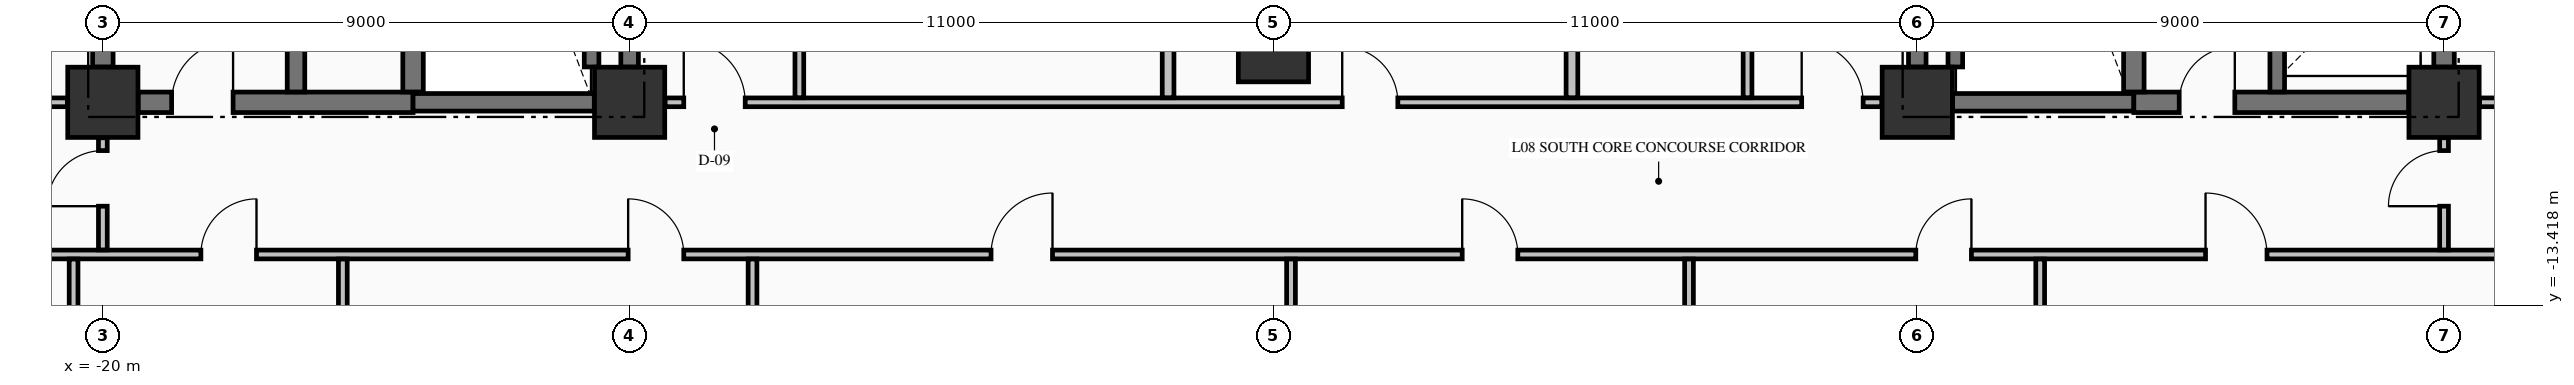
"""IFC4 building model, lengths in metres.
Left out: names, types, materials, properties, quantities, classifications, styles, units other than length and angle.
Written with IfcOpenShell. Run it as: python <this file> out.ifc"""

import sys

from ifc_helpers import new_model, si_unit, direction, frame, frame_2d, origin, origin_2d, place, context, subcontext, project, spatial, rectangle, extrude, element, fill, save


model = new_model("IFC4")
c1 = context("Model", 3, precision=1e-05, world=origin(), true_north=direction((0.0, 1.0)))
c2 = subcontext(c1, "Body", "Model", "MODEL_VIEW")
j1 = project(units=[si_unit("LENGTHUNIT", "METRE"), si_unit("PLANEANGLEUNIT", "RADIAN")], contexts=[c1])
p1 = place(None, origin())
s1 = spatial("IfcSite", under=j1, at=p1, CompositionType="ELEMENT")
p2 = place(p1, origin())
s2 = spatial("IfcBuilding", under=s1, at=p2, CompositionType="ELEMENT")
p3 = place(p2, frame((0.0, 0.0, 37.91)))
s3 = spatial("IfcBuildingStorey", under=s2, at=p3, CompositionType="ELEMENT", Elevation=37.91)
for number, where, z_axis, x_axis in (
    (1, (-20.0, -9.95, -0.25), (0.0, 0.0, 1.0), (1.0, 0.0, 0.0)),
    (2, (-11.0, -9.95, -0.25), (0.0, 0.0, 1.0), (1.0, 0.0, 0.0)),
    (3, (11.0, -9.95, -0.25), (0.0, 0.0, 1.0), (1.0, 0.0, 0.0)),
    (4, (20.0, -9.95, -0.25), (0.0, 0.0, 1.0), (1.0, 0.0, 0.0)),
    (5, (0.0, -9.0, -0.25), (0.0, 0.0, 1.0), (1.0, 0.0, 0.0)),
):
    element("IfcColumn", number, at=place(p3, frame(where, z_axis=z_axis, x_axis=x_axis)), inside=s3, PredefinedType="COLUMN", context=c2, shape_type="SweptSolid", body=[
        extrude(rectangle(XDim=1.2, YDim=1.2, at=origin_2d()), origin(), (0.0, 0.0, 1.0), 3.57),
    ])
p4 = place(p3, frame((-19.396, -9.95, 0.0), z_axis=(0.0, 0.0, 1.0), x_axis=(1.0, 0.0, 0.0)))
e6 = element("IfcWall", 6, at=p4, inside=s3, PredefinedType="SHEAR", context=c2, shape_type="SweptSolid", body=[
    extrude(rectangle(XDim=4.696, YDim=0.35, at=frame_2d((2.348, 0.0))), origin(), (0.0, 0.0, 1.0), 3.32),
])
p5 = place(p4, frame((0.571, 0.0, 0.0)))
e7 = element("IfcOpeningElement", 7, at=p5, cuts=e6, PredefinedType="OPENING", context=c2, shape_type="SweptSolid", body=[
    extrude(rectangle(XDim=1.05, YDim=2.15, at=frame_2d((0.525, 1.075))), frame((0.0, 0.185, 0.0), z_axis=(0.0, -1.0, 0.0), x_axis=(1.0, 0.0, 0.0)), (0.0, 0.0, 1.0), 0.37),
])
for number, where, z_axis, x_axis in (
    (8, (-14.7, -9.95, 0.0), (0.0, 0.0, 1.0), (1.0, 0.0, 0.0)),
    (9, (11.604, -9.95, 0.0), (0.0, 0.0, 1.0), (1.0, 0.0, 0.0)),
):
    element("IfcWall", number, at=place(p3, frame(where, z_axis=z_axis, x_axis=x_axis)), inside=s3, PredefinedType="SHEAR", context=c2, shape_type="SweptSolid", body=[
        extrude(rectangle(XDim=3.096, YDim=0.3, at=frame_2d((1.548, 0.0))), origin(), (0.0, 0.0, 1.0), 3.32),
    ])
p6 = place(p3, frame((14.7, -9.95, 0.0), z_axis=(0.0, 0.0, 1.0), x_axis=(1.0, 0.0, 0.0)))
e10 = element("IfcWall", 10, at=p6, inside=s3, PredefinedType="SHEAR", context=c2, shape_type="SweptSolid", body=[
    extrude(rectangle(XDim=4.696, YDim=0.35, at=frame_2d((2.348, 0.0))), origin(), (0.0, 0.0, 1.0), 3.32),
])
p7 = place(p6, frame((0.775, 0.0, 0.0)))
e11 = element("IfcOpeningElement", 11, at=p7, cuts=e10, PredefinedType="OPENING", context=c2, shape_type="SweptSolid", body=[
    extrude(rectangle(XDim=0.95, YDim=2.15, at=frame_2d((0.475, 1.075))), frame((0.0, 0.185, 0.0), z_axis=(0.0, -1.0, 0.0), x_axis=(1.0, 0.0, 0.0)), (0.0, 0.0, 1.0), 0.37),
])
p8 = place(p3, frame((-23.835, -12.55, 0.0), z_axis=(0.0, 0.0, 1.0), x_axis=(1.0, 0.0, 0.0)))
e12 = element("IfcWall", 12, at=p8, inside=s3, PredefinedType="PARTITIONING", context=c2, shape_type="SweptSolid", body=[
    extrude(rectangle(XDim=52.67, YDim=0.15, at=frame_2d((26.335, 0.0))), origin(), (0.0, 0.0, 1.0), 3.32),
])
p9 = place(p8, frame((5.51, 0.0, 0.0)))
e13 = element("IfcOpeningElement", 13, at=p9, cuts=e12, PredefinedType="OPENING", context=c2, shape_type="SweptSolid", body=[
    extrude(rectangle(XDim=0.95, YDim=2.15, at=frame_2d((0.475, 1.075))), frame((0.0, 0.085, 0.0), z_axis=(0.0, -1.0, 0.0), x_axis=(1.0, 0.0, 0.0)), (0.0, 0.0, 1.0), 0.17),
])
p10 = place(p8, frame((12.81, 0.0, 0.0)))
e14 = element("IfcOpeningElement", 14, at=p10, cuts=e12, PredefinedType="OPENING", context=c2, shape_type="SweptSolid", body=[
    extrude(rectangle(XDim=0.95, YDim=2.15, at=frame_2d((0.475, 1.075))), frame((0.0, 0.085, 0.0), z_axis=(0.0, -1.0, 0.0), x_axis=(1.0, 0.0, 0.0)), (0.0, 0.0, 1.0), 0.17),
])
p11 = place(p8, frame((19.01, 0.0, 0.0)))
e15 = element("IfcOpeningElement", 15, at=p11, cuts=e12, PredefinedType="OPENING", context=c2, shape_type="SweptSolid", body=[
    extrude(rectangle(XDim=1.05, YDim=2.15, at=frame_2d((0.525, 1.075))), frame((0.0, 0.085, 0.0), z_axis=(0.0, -1.0, 0.0), x_axis=(1.0, 0.0, 0.0)), (0.0, 0.0, 1.0), 0.17),
])
p12 = place(p8, frame((27.06, 0.0, 0.0)))
e16 = element("IfcOpeningElement", 16, at=p12, cuts=e12, PredefinedType="OPENING", context=c2, shape_type="SweptSolid", body=[
    extrude(rectangle(XDim=0.95, YDim=2.15, at=frame_2d((0.475, 1.075))), frame((0.0, 0.085, 0.0), z_axis=(0.0, -1.0, 0.0), x_axis=(1.0, 0.0, 0.0)), (0.0, 0.0, 1.0), 0.17),
])
p13 = place(p8, frame((34.81, 0.0, 0.0)))
e17 = element("IfcOpeningElement", 17, at=p13, cuts=e12, PredefinedType="OPENING", context=c2, shape_type="SweptSolid", body=[
    extrude(rectangle(XDim=0.95, YDim=2.15, at=frame_2d((0.475, 1.075))), frame((0.0, 0.085, 0.0), z_axis=(0.0, -1.0, 0.0), x_axis=(1.0, 0.0, 0.0)), (0.0, 0.0, 1.0), 0.17),
])
p14 = place(p8, frame((39.76, 0.0, 0.0)))
e18 = element("IfcOpeningElement", 18, at=p14, cuts=e12, PredefinedType="OPENING", context=c2, shape_type="SweptSolid", body=[
    extrude(rectangle(XDim=1.05, YDim=2.15, at=frame_2d((0.525, 1.075))), frame((0.0, 0.085, 0.0), z_axis=(0.0, -1.0, 0.0), x_axis=(1.0, 0.0, 0.0)), (0.0, 0.0, 1.0), 0.17),
])
p15 = place(p3, frame((-23.835, -9.95, 0.0), z_axis=(0.0, 0.0, 1.0), x_axis=(1.0, 0.0, 0.0)))
e19 = element("IfcWall", 19, at=p15, inside=s3, PredefinedType="PARTITIONING", context=c2, shape_type="SweptSolid", body=[
    extrude(rectangle(XDim=3.229, YDim=0.15, at=frame_2d((1.615, 0.0))), origin(), (0.0, 0.0, 1.0), 3.32),
])
p16 = place(p15, frame((1.335, 0.0, 0.0)))
e20 = element("IfcOpeningElement", 20, at=p16, cuts=e19, PredefinedType="OPENING", context=c2, shape_type="SweptSolid", body=[
    extrude(rectangle(XDim=1.0, YDim=2.15, at=frame_2d((0.5, 1.075))), frame((0.0, 0.085, 0.0), z_axis=(0.0, -1.0, 0.0), x_axis=(1.0, 0.0, 0.0)), (0.0, 0.0, 1.0), 0.17),
])
p17 = place(p3, frame((-10.394, -9.95, 0.0), z_axis=(0.0, 0.0, 1.0), x_axis=(1.0, 0.0, 0.0)))
e21 = element("IfcWall", 21, at=p17, inside=s3, PredefinedType="PARTITIONING", context=c2, shape_type="SweptSolid", body=[
    extrude(rectangle(XDim=20.788, YDim=0.15, at=frame_2d((10.394, 0.0))), origin(), (0.0, 0.0, 1.0), 3.32),
])
p18 = place(p17, frame((0.319, 0.0, 0.0)))
e22 = element("IfcOpeningElement", 22, at=p18, cuts=e21, PredefinedType="OPENING", context=c2, shape_type="SweptSolid", body=[
    extrude(rectangle(XDim=1.05, YDim=2.15, at=frame_2d((0.525, 1.075))), frame((0.0, 0.085, 0.0), z_axis=(0.0, -1.0, 0.0), x_axis=(1.0, 0.0, 0.0)), (0.0, 0.0, 1.0), 0.17),
])
p19 = place(p17, frame((19.419, 0.0, 0.0)))
e23 = element("IfcOpeningElement", 23, at=p19, cuts=e21, PredefinedType="OPENING", context=c2, shape_type="SweptSolid", body=[
    extrude(rectangle(XDim=1.05, YDim=2.15, at=frame_2d((0.525, 1.075))), frame((0.0, 0.085, 0.0), z_axis=(0.0, -1.0, 0.0), x_axis=(1.0, 0.0, 0.0)), (0.0, 0.0, 1.0), 0.17),
])
p20 = place(p17, frame((11.569, 0.0, 0.0)))
e24 = element("IfcOpeningElement", 24, at=p20, cuts=e21, PredefinedType="OPENING", context=c2, shape_type="SweptSolid", body=[
    extrude(rectangle(XDim=0.95, YDim=2.15, at=frame_2d((0.475, 1.075))), frame((0.0, 0.085, 0.0), z_axis=(0.0, -1.0, 0.0), x_axis=(1.0, 0.0, 0.0)), (0.0, 0.0, 1.0), 0.17),
])
p21 = place(p3, frame((20.606, -9.95, 0.0), z_axis=(0.0, 0.0, 1.0), x_axis=(1.0, 0.0, 0.0)))
e25 = element("IfcWall", 25, at=p21, inside=s3, PredefinedType="PARTITIONING", context=c2, shape_type="SweptSolid", body=[
    extrude(rectangle(XDim=8.229, YDim=0.15, at=frame_2d((4.115, 0.0))), origin(), (0.0, 0.0, 1.0), 3.32),
])
p22 = place(p21, frame((3.419, 0.0, 0.0)))
e26 = element("IfcOpeningElement", 26, at=p22, cuts=e25, PredefinedType="OPENING", context=c2, shape_type="SweptSolid", body=[
    extrude(rectangle(XDim=0.95, YDim=2.15, at=frame_2d((0.475, 1.075))), frame((0.0, 0.085, 0.0), z_axis=(0.0, -1.0, 0.0), x_axis=(1.0, 0.0, 0.0)), (0.0, 0.0, 1.0), 0.17),
])
p23 = place(p3, frame((-20.0, -9.346, 0.0), z_axis=(0.0, 0.0, 1.0), x_axis=(0.0, 1.0, 0.0)))
e27 = element("IfcWall", 27, at=p23, inside=s3, PredefinedType="SHEAR", context=c2, shape_type="SweptSolid", body=[
    extrude(rectangle(XDim=8.742, YDim=0.35, at=frame_2d((4.371, 0.0))), origin(), (0.0, 0.0, 1.0), 3.32),
])
p24 = place(p3, frame((-16.7, -9.773, 0.0), z_axis=(0.0, 0.0, 1.0), x_axis=(0.0, 1.0, 0.0)))
e28 = element("IfcWall", 28, at=p24, inside=s3, PredefinedType="SHEAR", context=c2, shape_type="SweptSolid", body=[
    extrude(rectangle(XDim=9.371, YDim=0.3, at=frame_2d((4.686, 0.0))), origin(), (0.0, 0.0, 1.0), 3.32),
])
p25 = place(p3, frame((-14.7, -9.773, 0.0), z_axis=(0.0, 0.0, 1.0), x_axis=(0.0, 1.0, 0.0)))
e29 = element("IfcWall", 29, at=p25, inside=s3, PredefinedType="SHEAR", context=c2, shape_type="SweptSolid", body=[
    extrude(rectangle(XDim=9.371, YDim=0.35, at=frame_2d((4.686, 0.0))), origin(), (0.0, 0.0, 1.0), 3.32),
])
p26 = place(p3, frame((-11.65, -9.346, 0.0), z_axis=(0.0, 0.0, 1.0), x_axis=(0.0, 1.0, 0.0)))
e30 = element("IfcWall", 30, at=p26, inside=s3, PredefinedType="SOLIDWALL", context=c2, shape_type="SweptSolid", body=[
    extrude(rectangle(XDim=8.742, YDim=0.25, at=frame_2d((4.371, 0.0))), origin(), (0.0, 0.0, 1.0), 3.32),
])
for number, where, z_axis, x_axis in (
    (31, (-11.0, -9.346, 0.0), (0.0, 0.0, 1.0), (0.0, 1.0, 0.0)),
    (32, (11.0, -9.346, 0.0), (0.0, 0.0, 1.0), (0.0, 1.0, 0.0)),
):
    element("IfcWall", number, at=place(p3, frame(where, z_axis=z_axis, x_axis=x_axis)), inside=s3, PredefinedType="SHEAR", context=c2, shape_type="SweptSolid", body=[
        extrude(rectangle(XDim=8.742, YDim=0.3, at=frame_2d((4.371, 0.0))), origin(), (0.0, 0.0, 1.0), 3.32),
    ])
p27 = place(p3, frame((11.65, -9.346, 0.0), z_axis=(0.0, 0.0, 1.0), x_axis=(0.0, 1.0, 0.0)))
e33 = element("IfcWall", 33, at=p27, inside=s3, PredefinedType="SOLIDWALL", context=c2, shape_type="SweptSolid", body=[
    extrude(rectangle(XDim=8.742, YDim=0.25, at=frame_2d((4.371, 0.0))), origin(), (0.0, 0.0, 1.0), 3.32),
])
p28 = place(p3, frame((14.7, -9.773, 0.0), z_axis=(0.0, 0.0, 1.0), x_axis=(0.0, 1.0, 0.0)))
e34 = element("IfcWall", 34, at=p28, inside=s3, PredefinedType="SHEAR", context=c2, shape_type="SweptSolid", body=[
    extrude(rectangle(XDim=9.371, YDim=0.35, at=frame_2d((4.686, 0.0))), origin(), (0.0, 0.0, 1.0), 3.32),
])
p29 = place(p3, frame((17.15, -9.773, 0.0), z_axis=(0.0, 0.0, 1.0), x_axis=(0.0, 1.0, 0.0)))
e35 = element("IfcWall", 35, at=p29, inside=s3, PredefinedType="SOLIDWALL", context=c2, shape_type="SweptSolid", body=[
    extrude(rectangle(XDim=2.596, YDim=0.25, at=frame_2d((1.298, 0.0))), origin(), (0.0, 0.0, 1.0), 3.32),
])
p30 = place(p3, frame((20.0, -9.346, 0.0), z_axis=(0.0, 0.0, 1.0), x_axis=(0.0, 1.0, 0.0)))
e36 = element("IfcWall", 36, at=p30, inside=s3, PredefinedType="SHEAR", context=c2, shape_type="SweptSolid", body=[
    extrude(rectangle(XDim=2.169, YDim=0.35, at=frame_2d((1.084, 0.0))), origin(), (0.0, 0.0, 1.0), 3.32),
])
p31 = place(p3, frame((-20.5, -22.294, 0.0), z_axis=(0.0, 0.0, 1.0), x_axis=(0.0, 1.0, 0.0)))
e37 = element("IfcWall", 37, at=p31, inside=s3, PredefinedType="PARTITIONING", context=c2, shape_type="SweptSolid", body=[
    extrude(rectangle(XDim=9.666, YDim=0.15, at=frame_2d((4.833, 0.0))), origin(), (0.0, 0.0, 1.0), 3.32),
])
p32 = place(p3, frame((-20.0, -12.472, 0.0), z_axis=(0.0, 0.0, 1.0), x_axis=(0.0, 1.0, 0.0)))
e38 = element("IfcWall", 38, at=p32, inside=s3, PredefinedType="PARTITIONING", context=c2, shape_type="SweptSolid", body=[
    extrude(rectangle(XDim=1.916, YDim=0.15, at=frame_2d((0.958, 0.0))), origin(), (0.0, 0.0, 1.0), 3.32),
])
p33 = place(p32, frame((0.747, 0.0, 0.0)))
e39 = element("IfcOpeningElement", 39, at=p33, cuts=e38, PredefinedType="OPENING", context=c2, shape_type="SweptSolid", body=[
    extrude(rectangle(XDim=0.95, YDim=2.15, at=frame_2d((0.475, 1.075))), frame((0.0, 0.085, 0.0), z_axis=(0.0, -1.0, 0.0), x_axis=(1.0, 0.0, 0.0)), (0.0, 0.0, 1.0), 0.17),
])
for number, where, z_axis, x_axis in (
    (40, (-15.9, -26.335, 0.0), (0.0, 0.0, 1.0), (0.0, 1.0, 0.0)),
    (41, (-8.9, -26.335, 0.0), (0.0, 0.0, 1.0), (0.0, 1.0, 0.0)),
):
    element("IfcWall", number, at=place(p3, frame(where, z_axis=z_axis, x_axis=x_axis)), inside=s3, PredefinedType="PARTITIONING", context=c2, shape_type="SweptSolid", body=[
        extrude(rectangle(XDim=13.707, YDim=0.15, at=frame_2d((6.854, 0.0))), origin(), (0.0, 0.0, 1.0), 3.32),
    ])
p34 = place(p3, frame((-8.1, -9.872, 0.0), z_axis=(0.0, 0.0, 1.0), x_axis=(0.0, 1.0, 0.0)))
e42 = element("IfcWall", 42, at=p34, inside=s3, PredefinedType="PARTITIONING", context=c2, shape_type="SweptSolid", body=[
    extrude(rectangle(XDim=10.569, YDim=0.15, at=frame_2d((5.285, 0.0))), origin(), (0.0, 0.0, 1.0), 3.32),
])
p35 = place(p34, frame((4.827, 0.0, 0.0)))
e43 = element("IfcOpeningElement", 43, at=p35, cuts=e42, PredefinedType="OPENING", context=c2, shape_type="SweptSolid", body=[
    extrude(rectangle(XDim=0.95, YDim=2.15, at=frame_2d((0.475, 1.075))), frame((0.0, 0.085, 0.0), z_axis=(0.0, -1.0, 0.0), x_axis=(1.0, 0.0, 0.0)), (0.0, 0.0, 1.0), 0.17),
])
p36 = place(p3, frame((-1.8, -9.872, 0.0), z_axis=(0.0, 0.0, 1.0), x_axis=(0.0, 1.0, 0.0)))
e44 = element("IfcWall", 44, at=p36, inside=s3, PredefinedType="PARTITIONING", context=c2, shape_type="SweptSolid", body=[
    extrude(rectangle(XDim=4.969, YDim=0.2, at=frame_2d((2.484, 0.0))), origin(), (0.0, 0.0, 1.0), 3.32),
])
p37 = place(p3, frame((0.3, -25.794, 0.0), z_axis=(0.0, 0.0, 1.0), x_axis=(0.0, 1.0, 0.0)))
e45 = element("IfcWall", 45, at=p37, inside=s3, PredefinedType="PARTITIONING", context=c2, shape_type="SweptSolid", body=[
    extrude(rectangle(XDim=13.166, YDim=0.15, at=frame_2d((6.583, 0.0))), origin(), (0.0, 0.0, 1.0), 2.66),
])
p38 = place(p3, frame((5.1, -9.872, 0.0), z_axis=(0.0, 0.0, 1.0), x_axis=(0.0, 1.0, 0.0)))
e46 = element("IfcWall", 46, at=p38, inside=s3, PredefinedType="PARTITIONING", context=c2, shape_type="SweptSolid", body=[
    extrude(rectangle(XDim=4.969, YDim=0.2, at=frame_2d((2.484, 0.0))), origin(), (0.0, 0.0, 1.0), 3.32),
])
p39 = place(p3, frame((7.1, -26.335, 0.0), z_axis=(0.0, 0.0, 1.0), x_axis=(0.0, 1.0, 0.0)))
e47 = element("IfcWall", 47, at=p39, inside=s3, PredefinedType="PARTITIONING", context=c2, shape_type="SweptSolid", body=[
    extrude(rectangle(XDim=13.707, YDim=0.15, at=frame_2d((6.854, 0.0))), origin(), (0.0, 0.0, 1.0), 3.32),
])
p40 = place(p3, frame((8.1, -9.872, 0.0), z_axis=(0.0, 0.0, 1.0), x_axis=(0.0, 1.0, 0.0)))
e48 = element("IfcWall", 48, at=p40, inside=s3, PredefinedType="PARTITIONING", context=c2, shape_type="SweptSolid", body=[
    extrude(rectangle(XDim=4.969, YDim=0.15, at=frame_2d((2.484, 0.0))), origin(), (0.0, 0.0, 1.0), 3.32),
])
p41 = place(p40, frame((1.997, 0.0, 0.0)))
e49 = element("IfcOpeningElement", 49, at=p41, cuts=e48, PredefinedType="OPENING", context=c2, shape_type="SweptSolid", body=[
    extrude(rectangle(XDim=0.95, YDim=2.15, at=frame_2d((0.475, 1.075))), frame((0.0, 0.085, 0.0), z_axis=(0.0, -1.0, 0.0), x_axis=(1.0, 0.0, 0.0)), (0.0, 0.0, 1.0), 0.17),
])
p42 = place(p3, frame((13.1, -26.335, 0.0), z_axis=(0.0, 0.0, 1.0), x_axis=(0.0, 1.0, 0.0)))
e50 = element("IfcWall", 50, at=p42, inside=s3, PredefinedType="PARTITIONING", context=c2, shape_type="SweptSolid", body=[
    extrude(rectangle(XDim=13.707, YDim=0.15, at=frame_2d((6.854, 0.0))), origin(), (0.0, 0.0, 1.0), 3.32),
])
p43 = place(p3, frame((20.0, -12.472, 0.0), z_axis=(0.0, 0.0, 1.0), x_axis=(0.0, 1.0, 0.0)))
e51 = element("IfcWall", 51, at=p43, inside=s3, PredefinedType="PARTITIONING", context=c2, shape_type="SweptSolid", body=[
    extrude(rectangle(XDim=1.916, YDim=0.15, at=frame_2d((0.958, 0.0))), origin(), (0.0, 0.0, 1.0), 2.66),
])
p44 = place(p43, frame((0.747, 0.0, 0.0)))
e52 = element("IfcOpeningElement", 52, at=p44, cuts=e51, PredefinedType="OPENING", context=c2, shape_type="SweptSolid", body=[
    extrude(rectangle(XDim=0.95, YDim=2.15, at=frame_2d((0.475, 1.075))), frame((0.0, 0.085, 0.0), z_axis=(0.0, -1.0, 0.0), x_axis=(1.0, 0.0, 0.0)), (0.0, 0.0, 1.0), 0.17),
])
p45 = place(p5, origin())
e53 = element("IfcDoor", 53, at=p45, inside=s3, OperationType="SINGLE_SWING_RIGHT", PredefinedType="DOOR", context=c2, shape_type="SweptSolid", body=[
    extrude(rectangle(XDim=1.05, YDim=2.15, at=frame_2d((0.525, 1.075))), frame((0.0, 0.025, 0.0), z_axis=(0.0, -1.0, 0.0), x_axis=(1.0, 0.0, 0.0)), (0.0, 0.0, 1.0), 0.05),
])
fill(e7, e53)
p46 = place(p7, origin())
e54 = element("IfcDoor", 54, at=p46, inside=s3, OperationType="SINGLE_SWING_RIGHT", PredefinedType="DOOR", context=c2, shape_type="SweptSolid", body=[
    extrude(rectangle(XDim=0.95, YDim=2.15, at=frame_2d((0.475, 1.075))), frame((0.0, 0.025, 0.0), z_axis=(0.0, -1.0, 0.0), x_axis=(1.0, 0.0, 0.0)), (0.0, 0.0, 1.0), 0.05),
])
fill(e11, e54)
p47 = place(p18, origin())
e55 = element("IfcDoor", 55, at=p47, inside=s3, OperationType="SINGLE_SWING_LEFT", PredefinedType="DOOR", context=c2, shape_type="SweptSolid", body=[
    extrude(rectangle(XDim=1.05, YDim=2.15, at=frame_2d((0.525, 1.075))), frame((0.0, 0.025, 0.0), z_axis=(0.0, -1.0, 0.0), x_axis=(1.0, 0.0, 0.0)), (0.0, 0.0, 1.0), 0.05),
])
fill(e22, e55)
p48 = place(p19, origin())
e56 = element("IfcDoor", 56, at=p48, inside=s3, OperationType="SINGLE_SWING_LEFT", PredefinedType="DOOR", context=c2, shape_type="SweptSolid", body=[
    extrude(rectangle(XDim=1.05, YDim=2.15, at=frame_2d((0.525, 1.075))), frame((0.0, 0.025, 0.0), z_axis=(0.0, -1.0, 0.0), x_axis=(1.0, 0.0, 0.0)), (0.0, 0.0, 1.0), 0.05),
])
fill(e23, e56)
p49 = place(p9, origin())
e57 = element("IfcDoor", 57, at=p49, inside=s3, OperationType="SINGLE_SWING_RIGHT", PredefinedType="DOOR", context=c2, shape_type="SweptSolid", body=[
    extrude(rectangle(XDim=0.95, YDim=2.15, at=frame_2d((0.475, 1.075))), frame((0.0, 0.025, 0.0), z_axis=(0.0, -1.0, 0.0), x_axis=(1.0, 0.0, 0.0)), (0.0, 0.0, 1.0), 0.05),
])
fill(e13, e57)
p50 = place(p10, origin())
e58 = element("IfcDoor", 58, at=p50, inside=s3, OperationType="SINGLE_SWING_LEFT", PredefinedType="DOOR", context=c2, shape_type="SweptSolid", body=[
    extrude(rectangle(XDim=0.95, YDim=2.15, at=frame_2d((0.475, 1.075))), frame((0.0, 0.025, 0.0), z_axis=(0.0, -1.0, 0.0), x_axis=(1.0, 0.0, 0.0)), (0.0, 0.0, 1.0), 0.05),
])
fill(e14, e58)
p51 = place(p11, origin())
e59 = element("IfcDoor", 59, at=p51, inside=s3, OperationType="SINGLE_SWING_RIGHT", PredefinedType="DOOR", context=c2, shape_type="SweptSolid", body=[
    extrude(rectangle(XDim=1.05, YDim=2.15, at=frame_2d((0.525, 1.075))), frame((0.0, 0.025, 0.0), z_axis=(0.0, -1.0, 0.0), x_axis=(1.0, 0.0, 0.0)), (0.0, 0.0, 1.0), 0.05),
])
fill(e15, e59)
p52 = place(p12, origin())
e60 = element("IfcDoor", 60, at=p52, inside=s3, OperationType="SINGLE_SWING_LEFT", PredefinedType="DOOR", context=c2, shape_type="SweptSolid", body=[
    extrude(rectangle(XDim=0.95, YDim=2.15, at=frame_2d((0.475, 1.075))), frame((0.0, 0.025, 0.0), z_axis=(0.0, -1.0, 0.0), x_axis=(1.0, 0.0, 0.0)), (0.0, 0.0, 1.0), 0.05),
])
fill(e16, e60)
p53 = place(p13, origin())
e61 = element("IfcDoor", 61, at=p53, inside=s3, OperationType="SINGLE_SWING_RIGHT", PredefinedType="DOOR", context=c2, shape_type="SweptSolid", body=[
    extrude(rectangle(XDim=0.95, YDim=2.15, at=frame_2d((0.475, 1.075))), frame((0.0, 0.025, 0.0), z_axis=(0.0, -1.0, 0.0), x_axis=(1.0, 0.0, 0.0)), (0.0, 0.0, 1.0), 0.05),
])
fill(e17, e61)
p54 = place(p14, origin())
e62 = element("IfcDoor", 62, at=p54, inside=s3, OperationType="SINGLE_SWING_LEFT", PredefinedType="DOOR", context=c2, shape_type="SweptSolid", body=[
    extrude(rectangle(XDim=1.05, YDim=2.15, at=frame_2d((0.525, 1.075))), frame((0.0, 0.025, 0.0), z_axis=(0.0, -1.0, 0.0), x_axis=(1.0, 0.0, 0.0)), (0.0, 0.0, 1.0), 0.05),
])
fill(e18, e62)
p55 = place(p20, origin())
e63 = element("IfcDoor", 63, at=p55, inside=s3, OperationType="SINGLE_SWING_LEFT", PredefinedType="DOOR", context=c2, shape_type="SweptSolid", body=[
    extrude(rectangle(XDim=0.95, YDim=2.15, at=frame_2d((0.475, 1.075))), frame((0.0, 0.025, 0.0), z_axis=(0.0, -1.0, 0.0), x_axis=(1.0, 0.0, 0.0)), (0.0, 0.0, 1.0), 0.05),
])
fill(e24, e63)
p56 = place(p33, origin())
e64 = element("IfcDoor", 64, at=p56, inside=s3, OperationType="SINGLE_SWING_LEFT", PredefinedType="DOOR", context=c2, shape_type="SweptSolid", body=[
    extrude(rectangle(XDim=0.95, YDim=2.15, at=frame_2d((0.475, 1.075))), frame((0.0, 0.025, 0.0), z_axis=(0.0, -1.0, 0.0), x_axis=(1.0, 0.0, 0.0)), (0.0, 0.0, 1.0), 0.05),
])
fill(e39, e64)
p57 = place(p44, origin())
e65 = element("IfcDoor", 65, at=p57, inside=s3, OperationType="SINGLE_SWING_LEFT", PredefinedType="DOOR", context=c2, shape_type="SweptSolid", body=[
    extrude(rectangle(XDim=0.95, YDim=2.15, at=frame_2d((0.475, 1.075))), frame((0.0, 0.025, 0.0), z_axis=(0.0, -1.0, 0.0), x_axis=(1.0, 0.0, 0.0)), (0.0, 0.0, 1.0), 0.05),
])
fill(e52, e65)
save(model, sys.argv[1])
